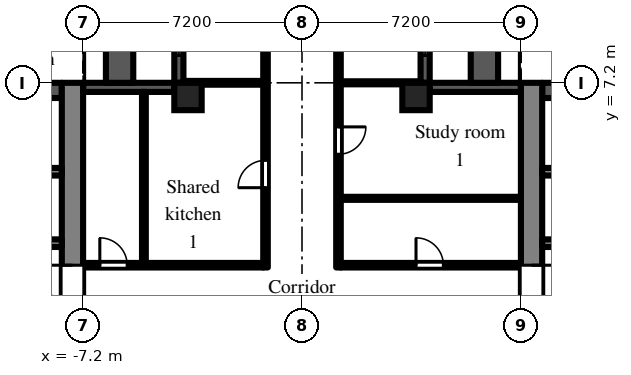
"""IFC4 building model, lengths in metres.
Left out: names, types, materials, properties, quantities, classifications, styles, units other than length and angle.
Written with IfcOpenShell. Run it as: python <this file> out.ifc"""

import sys

from ifc_helpers import new_model, si_unit, direction, frame, frame_2d, origin, origin_2d, place, context, subcontext, project, spatial, rectangle, extrude, element, fill, save


model = new_model("IFC4")
c1 = context("Model", 3, precision=1e-05, world=origin(), true_north=direction((0.0, 1.0)))
c2 = subcontext(c1, "Body", "Model", "MODEL_VIEW")
j1 = project(units=[si_unit("LENGTHUNIT", "METRE"), si_unit("PLANEANGLEUNIT", "RADIAN")], contexts=[c1])
p1 = place(None, origin())
s1 = spatial("IfcSite", under=j1, at=p1, CompositionType="ELEMENT")
p2 = place(p1, origin())
s2 = spatial("IfcBuilding", under=s1, at=p2, CompositionType="ELEMENT")
p3 = place(p2, frame((0.0, 0.0, 29.7)))
s3 = spatial("IfcBuildingStorey", under=s2, at=p3, CompositionType="ELEMENT", Elevation=29.7)
for number, where, z_axis, x_axis in (
    (1, (-3.75, 6.75, 0.0), (0.0, 0.0, 1.0), (1.0, 0.0, 0.0)),
    (2, (3.75, 6.75, 0.0), (0.0, 0.0, 1.0), (1.0, 0.0, 0.0)),
):
    element("IfcColumn", number, at=place(p3, frame(where, z_axis=z_axis, x_axis=x_axis)), inside=s3, PredefinedType="COLUMN", context=c2, shape_type="SweptSolid", body=[
        extrude(rectangle(XDim=0.9, YDim=0.9, at=origin_2d()), origin(), (0.0, 0.0, 1.0), 3.0),
    ])
p4 = place(p3, frame((7.2, 7.05, 0.0), z_axis=(0.0, 0.0, 1.0), x_axis=(-1.0, 0.0, 0.0)))
e3 = element("IfcWall", 3, at=p4, inside=s3, PredefinedType="SOLIDWALL", context=c2, shape_type="SweptSolid", body=[
    extrude(rectangle(XDim=3.0, YDim=0.3, at=frame_2d((1.5, 0.0))), origin(), (0.0, 0.0, 1.0), 2.1),
])
p5 = place(p3, frame((4.05, 7.2, 0.0), z_axis=(0.0, 0.0, 1.0), x_axis=(0.0, 1.0, 0.0)))
e4 = element("IfcWall", 4, at=p5, inside=s3, PredefinedType="SOLIDWALL", context=c2, shape_type="SweptSolid", body=[
    extrude(rectangle(XDim=7.2, YDim=0.3, at=frame_2d((3.6, 0.0))), origin(), (0.0, 0.0, 1.0), 2.1),
])
p6 = place(p5, frame((3.0, 0.0, 0.0)))
e5 = element("IfcOpeningElement", 5, at=p6, cuts=e4, PredefinedType="OPENING", context=c2, shape_type="SweptSolid", body=[
    extrude(rectangle(XDim=1.2, YDim=2.05, at=frame_2d((0.6, 1.025))), frame((0.0, 0.16, 0.0), z_axis=(0.0, -1.0, 0.0), x_axis=(1.0, 0.0, 0.0)), (0.0, 0.0, 1.0), 0.32),
])
p7 = place(p5, frame((0.9, 0.0, 0.2)))
e6 = element("IfcOpeningElement", 6, at=p7, cuts=e4, PredefinedType="OPENING", context=c2, shape_type="SweptSolid", body=[
    extrude(rectangle(XDim=1.8, YDim=1.85, at=frame_2d((0.9, 0.925))), frame((0.0, 0.16, 0.0), z_axis=(0.0, -1.0, 0.0), x_axis=(1.0, 0.0, 0.0)), (0.0, 0.0, 1.0), 0.32),
])
p8 = place(p5, frame((4.5, 0.0, 0.2)))
e7 = element("IfcOpeningElement", 7, at=p8, cuts=e4, PredefinedType="OPENING", context=c2, shape_type="SweptSolid", body=[
    extrude(rectangle(XDim=1.8, YDim=1.85, at=frame_2d((0.9, 0.925))), frame((0.0, 0.16, 0.0), z_axis=(0.0, -1.0, 0.0), x_axis=(1.0, 0.0, 0.0)), (0.0, 0.0, 1.0), 0.32),
])
p9 = place(p3, frame((-4.05, 14.4, 0.0), z_axis=(0.0, 0.0, 1.0), x_axis=(0.0, -1.0, 0.0)))
e8 = element("IfcWall", 8, at=p9, inside=s3, PredefinedType="SOLIDWALL", context=c2, shape_type="SweptSolid", body=[
    extrude(rectangle(XDim=7.2, YDim=0.3, at=frame_2d((3.6, 0.0))), origin(), (0.0, 0.0, 1.0), 2.1),
])
p10 = place(p9, frame((3.0, 0.0, 0.0)))
e9 = element("IfcOpeningElement", 9, at=p10, cuts=e8, PredefinedType="OPENING", context=c2, shape_type="SweptSolid", body=[
    extrude(rectangle(XDim=1.2, YDim=2.05, at=frame_2d((0.6, 1.025))), frame((0.0, 0.16, 0.0), z_axis=(0.0, -1.0, 0.0), x_axis=(1.0, 0.0, 0.0)), (0.0, 0.0, 1.0), 0.32),
])
p11 = place(p9, frame((0.9, 0.0, 0.2)))
e10 = element("IfcOpeningElement", 10, at=p11, cuts=e8, PredefinedType="OPENING", context=c2, shape_type="SweptSolid", body=[
    extrude(rectangle(XDim=1.8, YDim=1.85, at=frame_2d((0.9, 0.925))), frame((0.0, 0.16, 0.0), z_axis=(0.0, -1.0, 0.0), x_axis=(1.0, 0.0, 0.0)), (0.0, 0.0, 1.0), 0.32),
])
p12 = place(p9, frame((4.5, 0.0, 0.2)))
e11 = element("IfcOpeningElement", 11, at=p12, cuts=e8, PredefinedType="OPENING", context=c2, shape_type="SweptSolid", body=[
    extrude(rectangle(XDim=1.8, YDim=1.85, at=frame_2d((0.9, 0.925))), frame((0.0, 0.16, 0.0), z_axis=(0.0, -1.0, 0.0), x_axis=(1.0, 0.0, 0.0)), (0.0, 0.0, 1.0), 0.32),
])
p13 = place(p3, frame((-4.2, 7.05, 0.0), z_axis=(0.0, 0.0, 1.0), x_axis=(-1.0, 0.0, 0.0)))
e12 = element("IfcWall", 12, at=p13, inside=s3, PredefinedType="SOLIDWALL", context=c2, shape_type="SweptSolid", body=[
    extrude(rectangle(XDim=3.0, YDim=0.3, at=frame_2d((1.5, 0.0))), origin(), (0.0, 0.0, 1.0), 2.1),
])
for number, where, z_axis, x_axis in (
    (13, (6.0, 7.2, 0.0), (0.0, 0.0, 1.0), (0.0, 1.0, 0.0)),
    (14, (-6.0, 7.2, 0.0), (0.0, 0.0, 1.0), (0.0, 1.0, 0.0)),
):
    element("IfcWall", number, at=place(p3, frame(where, z_axis=z_axis, x_axis=x_axis)), inside=s3, PredefinedType="PARAPET", context=c2, shape_type="SweptSolid", body=[
        extrude(rectangle(XDim=7.2, YDim=0.9, at=frame_2d((3.6, 0.0))), origin(), (0.0, 0.0, 1.0), 0.8),
    ])
p14 = place(p3, frame((7.55, -7.2, 0.0), z_axis=(0.0, 0.0, 1.0), x_axis=(0.0, 1.0, 0.0)))
e15 = element("IfcWall", 15, at=p14, inside=s3, PredefinedType="SHEAR", context=c2, shape_type="SweptSolid", body=[
    extrude(rectangle(XDim=14.4, YDim=0.7, at=frame_2d((7.2, 0.0))), origin(), (0.0, 0.0, 1.0), 2.575),
])
p15 = place(p14, frame((6.0, 0.0, 0.0)))
e16 = element("IfcOpeningElement", 16, at=p15, cuts=e15, PredefinedType="OPENING", context=c2, shape_type="SweptSolid", body=[
    extrude(rectangle(XDim=2.4, YDim=2.2, at=frame_2d((1.2, 1.1))), frame((0.0, 0.36, 0.0), z_axis=(0.0, -1.0, 0.0), x_axis=(1.0, 0.0, 0.0)), (0.0, 0.0, 1.0), 0.72),
])
p16 = place(p3, frame((7.9, 6.95, 0.0), z_axis=(0.0, 0.0, 1.0), x_axis=(1.0, 0.0, 0.0)))
e17 = element("IfcWall", 17, at=p16, inside=s3, PredefinedType="SHEAR", context=c2, shape_type="SweptSolid", body=[
    extrude(rectangle(XDim=12.95, YDim=0.5, at=frame_2d((6.475, 0.0))), origin(), (0.0, 0.0, 1.0), 2.575),
])
p17 = place(p3, frame((7.9, 1.925, 0.0), z_axis=(0.0, 0.0, 1.0), x_axis=(1.0, 0.0, 0.0)))
e18 = element("IfcWall", 18, at=p17, inside=s3, PredefinedType="SHEAR", context=c2, shape_type="SweptSolid", body=[
    extrude(rectangle(XDim=12.95, YDim=0.25, at=frame_2d((6.475, 0.0))), origin(), (0.0, 0.0, 1.0), 2.575),
])
p18 = place(p17, frame((0.525, 0.0, 0.0)))
e19 = element("IfcOpeningElement", 19, at=p18, cuts=e18, PredefinedType="OPENING", context=c2, shape_type="SweptSolid", body=[
    extrude(rectangle(XDim=0.9, YDim=2.1, at=frame_2d((0.45, 1.05))), frame((0.0, 0.135, 0.0), z_axis=(0.0, -1.0, 0.0), x_axis=(1.0, 0.0, 0.0)), (0.0, 0.0, 1.0), 0.27),
])
p19 = place(p17, frame((2.625, 0.0, 0.0)))
e20 = element("IfcOpeningElement", 20, at=p19, cuts=e18, PredefinedType="OPENING", context=c2, shape_type="SweptSolid", body=[
    extrude(rectangle(XDim=1.1, YDim=2.1, at=frame_2d((0.55, 1.05))), frame((0.0, 0.135, 0.0), z_axis=(0.0, -1.0, 0.0), x_axis=(1.0, 0.0, 0.0)), (0.0, 0.0, 1.0), 0.27),
])
p20 = place(p17, frame((6.025, 0.0, 0.0)))
e21 = element("IfcOpeningElement", 21, at=p20, cuts=e18, PredefinedType="OPENING", context=c2, shape_type="SweptSolid", body=[
    extrude(rectangle(XDim=0.9, YDim=2.1, at=frame_2d((0.45, 1.05))), frame((0.0, 0.135, 0.0), z_axis=(0.0, -1.0, 0.0), x_axis=(1.0, 0.0, 0.0)), (0.0, 0.0, 1.0), 0.27),
])
p21 = place(p17, frame((9.325, 0.0, 0.0)))
e22 = element("IfcOpeningElement", 22, at=p21, cuts=e18, PredefinedType="OPENING", context=c2, shape_type="SweptSolid", body=[
    extrude(rectangle(XDim=0.9, YDim=2.1, at=frame_2d((0.45, 1.05))), frame((0.0, 0.135, 0.0), z_axis=(0.0, -1.0, 0.0), x_axis=(1.0, 0.0, 0.0)), (0.0, 0.0, 1.0), 0.27),
])
p22 = place(p3, frame((7.9, 4.275, 0.0), z_axis=(0.0, 0.0, 1.0), x_axis=(1.0, 0.0, 0.0)))
e23 = element("IfcWall", 23, at=p22, inside=s3, PredefinedType="SHEAR", context=c2, shape_type="SweptSolid", body=[
    extrude(rectangle(XDim=1.95, YDim=0.25, at=frame_2d((0.975, 0.0))), origin(), (0.0, 0.0, 1.0), 2.575),
])
p23 = place(p3, frame((-7.55, -7.2, 0.0), z_axis=(0.0, 0.0, 1.0), x_axis=(0.0, 1.0, 0.0)))
e24 = element("IfcWall", 24, at=p23, inside=s3, PredefinedType="SHEAR", context=c2, shape_type="SweptSolid", body=[
    extrude(rectangle(XDim=14.4, YDim=0.7, at=frame_2d((7.2, 0.0))), origin(), (0.0, 0.0, 1.0), 2.575),
])
p24 = place(p23, frame((6.0, 0.0, 0.0)))
e25 = element("IfcOpeningElement", 25, at=p24, cuts=e24, PredefinedType="OPENING", context=c2, shape_type="SweptSolid", body=[
    extrude(rectangle(XDim=2.4, YDim=2.2, at=frame_2d((1.2, 1.1))), frame((0.0, 0.36, 0.0), z_axis=(0.0, -1.0, 0.0), x_axis=(1.0, 0.0, 0.0)), (0.0, 0.0, 1.0), 0.72),
])
p25 = place(p3, frame((-7.9, 6.95, 0.0), z_axis=(0.0, 0.0, 1.0), x_axis=(-1.0, 0.0, 0.0)))
e26 = element("IfcWall", 26, at=p25, inside=s3, PredefinedType="SHEAR", context=c2, shape_type="SweptSolid", body=[
    extrude(rectangle(XDim=12.95, YDim=0.5, at=frame_2d((6.475, 0.0))), origin(), (0.0, 0.0, 1.0), 2.575),
])
p26 = place(p3, frame((-7.9, 1.925, 0.0), z_axis=(0.0, 0.0, 1.0), x_axis=(-1.0, 0.0, 0.0)))
e27 = element("IfcWall", 27, at=p26, inside=s3, PredefinedType="SHEAR", context=c2, shape_type="SweptSolid", body=[
    extrude(rectangle(XDim=12.95, YDim=0.25, at=frame_2d((6.475, 0.0))), origin(), (0.0, 0.0, 1.0), 2.575),
])
p27 = place(p26, frame((0.525, 0.0, 0.0)))
e28 = element("IfcOpeningElement", 28, at=p27, cuts=e27, PredefinedType="OPENING", context=c2, shape_type="SweptSolid", body=[
    extrude(rectangle(XDim=0.9, YDim=2.1, at=frame_2d((0.45, 1.05))), frame((0.0, 0.135, 0.0), z_axis=(0.0, -1.0, 0.0), x_axis=(1.0, 0.0, 0.0)), (0.0, 0.0, 1.0), 0.27),
])
p28 = place(p26, frame((2.625, 0.0, 0.0)))
e29 = element("IfcOpeningElement", 29, at=p28, cuts=e27, PredefinedType="OPENING", context=c2, shape_type="SweptSolid", body=[
    extrude(rectangle(XDim=1.1, YDim=2.1, at=frame_2d((0.55, 1.05))), frame((0.0, 0.135, 0.0), z_axis=(0.0, -1.0, 0.0), x_axis=(1.0, 0.0, 0.0)), (0.0, 0.0, 1.0), 0.27),
])
p29 = place(p26, frame((6.025, 0.0, 0.0)))
e30 = element("IfcOpeningElement", 30, at=p29, cuts=e27, PredefinedType="OPENING", context=c2, shape_type="SweptSolid", body=[
    extrude(rectangle(XDim=0.9, YDim=2.1, at=frame_2d((0.45, 1.05))), frame((0.0, 0.135, 0.0), z_axis=(0.0, -1.0, 0.0), x_axis=(1.0, 0.0, 0.0)), (0.0, 0.0, 1.0), 0.27),
])
p30 = place(p26, frame((9.325, 0.0, 0.0)))
e31 = element("IfcOpeningElement", 31, at=p30, cuts=e27, PredefinedType="OPENING", context=c2, shape_type="SweptSolid", body=[
    extrude(rectangle(XDim=0.9, YDim=2.1, at=frame_2d((0.45, 1.05))), frame((0.0, 0.135, 0.0), z_axis=(0.0, -1.0, 0.0), x_axis=(1.0, 0.0, 0.0)), (0.0, 0.0, 1.0), 0.27),
])
p31 = place(p3, frame((-7.9, 4.275, 0.0), z_axis=(0.0, 0.0, 1.0), x_axis=(-1.0, 0.0, 0.0)))
e32 = element("IfcWall", 32, at=p31, inside=s3, PredefinedType="SHEAR", context=c2, shape_type="SweptSolid", body=[
    extrude(rectangle(XDim=1.95, YDim=0.25, at=frame_2d((0.975, 0.0))), origin(), (0.0, 0.0, 1.0), 2.575),
])
p32 = place(p3, frame((-7.2, 1.2, 0.0), z_axis=(0.0, 0.0, 1.0), x_axis=(1.0, 0.0, 0.0)))
e33 = element("IfcWall", 33, at=p32, inside=s3, PredefinedType="PARTITIONING", context=c2, shape_type="SweptSolid", body=[
    extrude(rectangle(XDim=5.925, YDim=0.15, at=frame_2d((2.962, 0.0))), origin(), (0.0, 0.0, 1.0), 2.575),
])
p33 = place(p32, frame((0.55, 0.0, 0.0)))
e34 = element("IfcOpeningElement", 34, at=p33, cuts=e33, PredefinedType="OPENING", context=c2, shape_type="SweptSolid", body=[
    extrude(rectangle(XDim=0.9, YDim=2.1, at=frame_2d((0.45, 1.05))), frame((0.0, 0.085, 0.0), z_axis=(0.0, -1.0, 0.0), x_axis=(1.0, 0.0, 0.0)), (0.0, 0.0, 1.0), 0.17),
])
p34 = place(p3, frame((-5.2, 1.275, 0.0), z_axis=(0.0, 0.0, 1.0), x_axis=(0.0, 1.0, 0.0)))
e35 = element("IfcWall", 35, at=p34, inside=s3, PredefinedType="PARTITIONING", context=c2, shape_type="SweptSolid", body=[
    extrude(rectangle(XDim=5.625, YDim=0.125, at=frame_2d((2.812, 0.0))), origin(), (0.0, 0.0, 1.0), 2.575),
])
p35 = place(p3, frame((-3.9, 7.2, 0.0), z_axis=(0.0, 0.0, 1.0), x_axis=(1.0, 0.0, 0.0)))
e36 = element("IfcWall", 36, at=p35, inside=s3, PredefinedType="PARTITIONING", context=c2, shape_type="SweptSolid", body=[
    extrude(rectangle(XDim=2.625, YDim=0.125, at=frame_2d((1.312, 0.0))), origin(), (0.0, 0.0, 1.0), 2.575),
])
p36 = place(p3, frame((-1.2, 1.125, 0.0), z_axis=(0.0, 0.0, 1.0), x_axis=(0.0, 1.0, 0.0)))
e37 = element("IfcWall", 37, at=p36, inside=s3, PredefinedType="PARTITIONING", context=c2, shape_type="SweptSolid", body=[
    extrude(rectangle(XDim=35.375, YDim=0.15, at=frame_2d((17.688, 0.0))), origin(), (0.0, 0.0, 1.0), 2.575),
])
p37 = place(p36, frame((2.625, 0.0, 0.0)))
e38 = element("IfcOpeningElement", 38, at=p37, cuts=e37, PredefinedType="OPENING", context=c2, shape_type="SweptSolid", body=[
    extrude(rectangle(XDim=0.9, YDim=2.1, at=frame_2d((0.45, 1.05))), frame((0.0, 0.085, 0.0), z_axis=(0.0, -1.0, 0.0), x_axis=(1.0, 0.0, 0.0)), (0.0, 0.0, 1.0), 0.17),
])
p38 = place(p36, frame((11.025, 0.0, 0.0)))
e39 = element("IfcOpeningElement", 39, at=p38, cuts=e37, PredefinedType="OPENING", context=c2, shape_type="SweptSolid", body=[
    extrude(rectangle(XDim=0.9, YDim=2.1, at=frame_2d((0.45, 1.05))), frame((0.0, 0.085, 0.0), z_axis=(0.0, -1.0, 0.0), x_axis=(1.0, 0.0, 0.0)), (0.0, 0.0, 1.0), 0.17),
])
p39 = place(p36, frame((14.625, 0.0, 0.0)))
e40 = element("IfcOpeningElement", 40, at=p39, cuts=e37, PredefinedType="OPENING", context=c2, shape_type="SweptSolid", body=[
    extrude(rectangle(XDim=0.9, YDim=2.1, at=frame_2d((0.45, 1.05))), frame((0.0, 0.085, 0.0), z_axis=(0.0, -1.0, 0.0), x_axis=(1.0, 0.0, 0.0)), (0.0, 0.0, 1.0), 0.17),
])
p40 = place(p36, frame((32.825, 0.0, 0.0)))
e41 = element("IfcOpeningElement", 41, at=p40, cuts=e37, PredefinedType="OPENING", context=c2, shape_type="SweptSolid", body=[
    extrude(rectangle(XDim=1.0, YDim=2.1, at=frame_2d((0.5, 1.05))), frame((0.0, 0.085, 0.0), z_axis=(0.0, -1.0, 0.0), x_axis=(1.0, 0.0, 0.0)), (0.0, 0.0, 1.0), 0.17),
])
p41 = place(p3, frame((1.2, 1.125, 0.0), z_axis=(0.0, 0.0, 1.0), x_axis=(0.0, 1.0, 0.0)))
e42 = element("IfcWall", 42, at=p41, inside=s3, PredefinedType="PARTITIONING", context=c2, shape_type="SweptSolid", body=[
    extrude(rectangle(XDim=35.375, YDim=0.15, at=frame_2d((17.688, 0.0))), origin(), (0.0, 0.0, 1.0), 2.575),
])
p42 = place(p41, frame((3.725, 0.0, 0.0)))
e43 = element("IfcOpeningElement", 43, at=p42, cuts=e42, PredefinedType="OPENING", context=c2, shape_type="SweptSolid", body=[
    extrude(rectangle(XDim=0.9, YDim=2.1, at=frame_2d((0.45, 1.05))), frame((0.0, 0.085, 0.0), z_axis=(0.0, -1.0, 0.0), x_axis=(1.0, 0.0, 0.0)), (0.0, 0.0, 1.0), 0.17),
])
p43 = place(p41, frame((7.425, 0.0, 0.0)))
e44 = element("IfcOpeningElement", 44, at=p43, cuts=e42, PredefinedType="OPENING", context=c2, shape_type="SweptSolid", body=[
    extrude(rectangle(XDim=0.9, YDim=2.1, at=frame_2d((0.45, 1.05))), frame((0.0, 0.085, 0.0), z_axis=(0.0, -1.0, 0.0), x_axis=(1.0, 0.0, 0.0)), (0.0, 0.0, 1.0), 0.17),
])
p44 = place(p41, frame((13.475, 0.0, 0.0)))
e45 = element("IfcOpeningElement", 45, at=p44, cuts=e42, PredefinedType="OPENING", context=c2, shape_type="SweptSolid", body=[
    extrude(rectangle(XDim=1.0, YDim=2.1, at=frame_2d((0.5, 1.05))), frame((0.0, 0.085, 0.0), z_axis=(0.0, -1.0, 0.0), x_axis=(1.0, 0.0, 0.0)), (0.0, 0.0, 1.0), 0.17),
])
p45 = place(p41, frame((32.825, 0.0, 0.0)))
e46 = element("IfcOpeningElement", 46, at=p45, cuts=e42, PredefinedType="OPENING", context=c2, shape_type="SweptSolid", body=[
    extrude(rectangle(XDim=1.0, YDim=2.1, at=frame_2d((0.5, 1.05))), frame((0.0, 0.085, 0.0), z_axis=(0.0, -1.0, 0.0), x_axis=(1.0, 0.0, 0.0)), (0.0, 0.0, 1.0), 0.17),
])
p46 = place(p3, frame((1.275, 1.2, 0.0), z_axis=(0.0, 0.0, 1.0), x_axis=(1.0, 0.0, 0.0)))
e47 = element("IfcWall", 47, at=p46, inside=s3, PredefinedType="PARTITIONING", context=c2, shape_type="SweptSolid", body=[
    extrude(rectangle(XDim=5.925, YDim=0.15, at=frame_2d((2.962, 0.0))), origin(), (0.0, 0.0, 1.0), 2.575),
])
p47 = place(p46, frame((2.475, 0.0, 0.0)))
e48 = element("IfcOpeningElement", 48, at=p47, cuts=e47, PredefinedType="OPENING", context=c2, shape_type="SweptSolid", body=[
    extrude(rectangle(XDim=0.9, YDim=2.1, at=frame_2d((0.45, 1.05))), frame((0.0, 0.085, 0.0), z_axis=(0.0, -1.0, 0.0), x_axis=(1.0, 0.0, 0.0)), (0.0, 0.0, 1.0), 0.17),
])
p48 = place(p3, frame((1.275, 3.4, 0.0), z_axis=(0.0, 0.0, 1.0), x_axis=(1.0, 0.0, 0.0)))
e49 = element("IfcWall", 49, at=p48, inside=s3, PredefinedType="PARTITIONING", context=c2, shape_type="SweptSolid", body=[
    extrude(rectangle(XDim=5.925, YDim=0.1, at=frame_2d((2.962, 0.0))), origin(), (0.0, 0.0, 1.0), 2.575),
])
p49 = place(p3, frame((1.275, 7.2, 0.0), z_axis=(0.0, 0.0, 1.0), x_axis=(1.0, 0.0, 0.0)))
e50 = element("IfcWall", 50, at=p49, inside=s3, PredefinedType="PARTITIONING", context=c2, shape_type="SweptSolid", body=[
    extrude(rectangle(XDim=2.625, YDim=0.1, at=frame_2d((1.312, 0.0))), origin(), (0.0, 0.0, 1.0), 2.575),
])
p50 = place(p7, origin())
e51 = element("IfcWindow", 51, at=p50, inside=s3, PartitioningType="SINGLE_PANEL", PredefinedType="WINDOW", context=c2, shape_type="SweptSolid", body=[
    extrude(rectangle(XDim=1.8, YDim=1.85, at=frame_2d((0.9, 0.925))), frame((0.0, 0.03, 0.0), z_axis=(0.0, -1.0, 0.0), x_axis=(1.0, 0.0, 0.0)), (0.0, 0.0, 1.0), 0.06),
])
fill(e6, e51)
p51 = place(p12, origin())
e52 = element("IfcWindow", 52, at=p51, inside=s3, PartitioningType="SINGLE_PANEL", PredefinedType="WINDOW", context=c2, shape_type="SweptSolid", body=[
    extrude(rectangle(XDim=1.8, YDim=1.85, at=frame_2d((0.9, 0.925))), frame((0.0, 0.03, 0.0), z_axis=(0.0, -1.0, 0.0), x_axis=(1.0, 0.0, 0.0)), (0.0, 0.0, 1.0), 0.06),
])
fill(e11, e52)
p52 = place(p15, frame((2.4, 0.0, 0.0), z_axis=(0.0, 0.0, 1.0), x_axis=(-1.0, 0.0, 0.0)))
e53 = element("IfcDoor", 53, at=p52, inside=s3, OperationType="DOUBLE_DOOR_DOUBLE_SWING", PredefinedType="DOOR", context=c2, shape_type="SweptSolid", body=[
    extrude(rectangle(XDim=2.4, YDim=2.2, at=frame_2d((1.2, 1.1))), frame((0.0, 0.025, 0.0), z_axis=(0.0, -1.0, 0.0), x_axis=(1.0, 0.0, 0.0)), (0.0, 0.0, 1.0), 0.05),
])
fill(e16, e53)
p53 = place(p24, origin())
e54 = element("IfcDoor", 54, at=p53, inside=s3, OperationType="DOUBLE_DOOR_DOUBLE_SWING", PredefinedType="DOOR", context=c2, shape_type="SweptSolid", body=[
    extrude(rectangle(XDim=2.4, YDim=2.2, at=frame_2d((1.2, 1.1))), frame((0.0, 0.025, 0.0), z_axis=(0.0, -1.0, 0.0), x_axis=(1.0, 0.0, 0.0)), (0.0, 0.0, 1.0), 0.05),
])
fill(e25, e54)
p54 = place(p47, origin())
e55 = element("IfcDoor", 55, at=p54, inside=s3, OperationType="SINGLE_SWING_LEFT", PredefinedType="DOOR", context=c2, shape_type="SweptSolid", body=[
    extrude(rectangle(XDim=0.9, YDim=2.1, at=frame_2d((0.45, 1.05))), frame((0.0, 0.025, 0.0), z_axis=(0.0, -1.0, 0.0), x_axis=(1.0, 0.0, 0.0)), (0.0, 0.0, 1.0), 0.05),
])
fill(e48, e55)
p55 = place(p42, frame((0.9, 0.0, 0.0), z_axis=(0.0, 0.0, 1.0), x_axis=(-1.0, 0.0, 0.0)))
e56 = element("IfcDoor", 56, at=p55, inside=s3, OperationType="SINGLE_SWING_LEFT", PredefinedType="DOOR", context=c2, shape_type="SweptSolid", body=[
    extrude(rectangle(XDim=0.9, YDim=2.1, at=frame_2d((0.45, 1.05))), frame((0.0, 0.025, 0.0), z_axis=(0.0, -1.0, 0.0), x_axis=(1.0, 0.0, 0.0)), (0.0, 0.0, 1.0), 0.05),
])
fill(e43, e56)
p56 = place(p37, origin())
e57 = element("IfcDoor", 57, at=p56, inside=s3, OperationType="SINGLE_SWING_LEFT", PredefinedType="DOOR", context=c2, shape_type="SweptSolid", body=[
    extrude(rectangle(XDim=0.9, YDim=2.1, at=frame_2d((0.45, 1.05))), frame((0.0, 0.025, 0.0), z_axis=(0.0, -1.0, 0.0), x_axis=(1.0, 0.0, 0.0)), (0.0, 0.0, 1.0), 0.05),
])
fill(e38, e57)
p57 = place(p33, origin())
e58 = element("IfcDoor", 58, at=p57, inside=s3, OperationType="SINGLE_SWING_LEFT", PredefinedType="DOOR", context=c2, shape_type="SweptSolid", body=[
    extrude(rectangle(XDim=0.9, YDim=2.1, at=frame_2d((0.45, 1.05))), frame((0.0, 0.025, 0.0), z_axis=(0.0, -1.0, 0.0), x_axis=(1.0, 0.0, 0.0)), (0.0, 0.0, 1.0), 0.05),
])
fill(e34, e58)
save(model, sys.argv[1])
